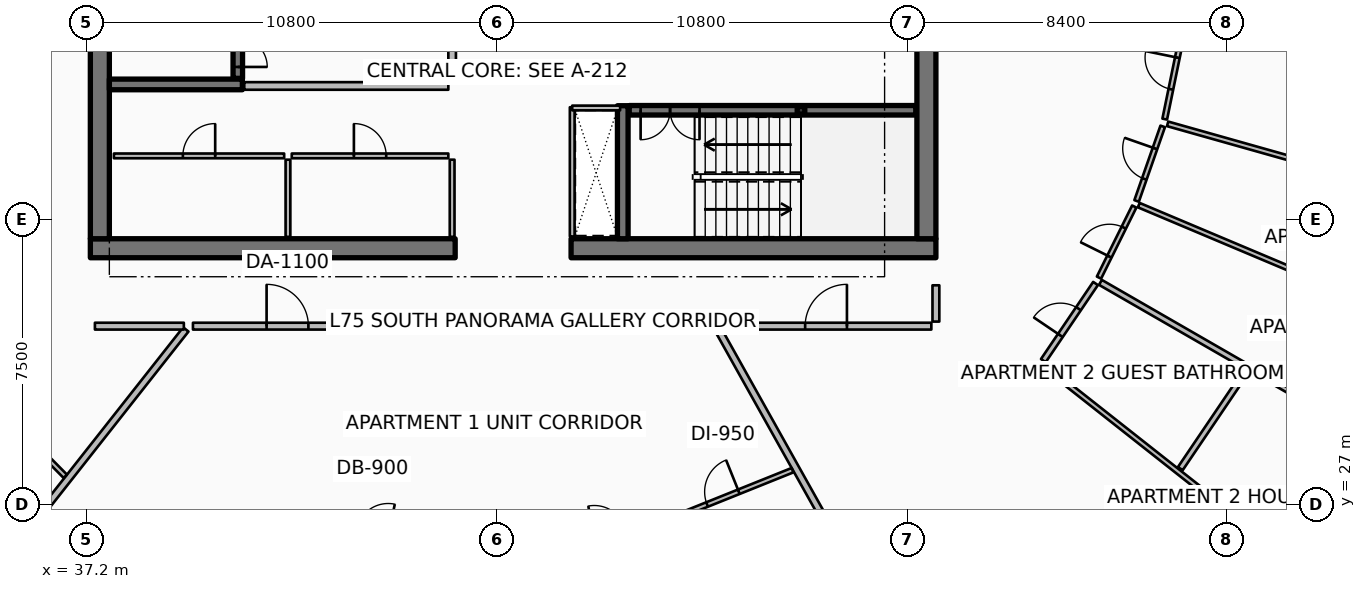
"""IFC4 building model, lengths in metres.
Left out: names, types, materials, properties, quantities, classifications, styles, units other than length and angle.
Written with IfcOpenShell. Run it as: python <this file> out.ifc"""

import sys

from ifc_helpers import new_model, si_unit, direction, frame, frame_2d, origin, origin_2d, place, context, subcontext, project, spatial, polyline, rectangle, hollow_rectangle, circle, outline, extrude, element, fill, save


model = new_model("IFC4")
c1 = context("Model", 3, precision=1e-05, world=origin(), true_north=direction((0.0, 1.0)))
c2 = subcontext(c1, "Body", "Model", "MODEL_VIEW")
j1 = project(units=[si_unit("LENGTHUNIT", "METRE"), si_unit("PLANEANGLEUNIT", "RADIAN")], contexts=[c1])
p1 = place(None, origin())
s1 = spatial("IfcSite", under=j1, at=p1, CompositionType="ELEMENT")
p2 = place(p1, origin())
s2 = spatial("IfcBuilding", under=s1, at=p2, CompositionType="ELEMENT")
p3 = place(p2, frame((0.0, 0.0, 298.3)))
s3 = spatial("IfcBuildingStorey", under=s2, at=p3, CompositionType="ELEMENT", Elevation=298.3)
p4 = place(p3, frame((37.3, 33.75, 0.0), z_axis=(0.0, 0.0, 1.0), x_axis=(1.0, 0.0, 0.0)))
e1 = element("IfcWall", 1, at=p4, inside=s3, PredefinedType="SHEAR", context=c2, shape_type="SweptSolid", body=[
    extrude(rectangle(XDim=9.6, YDim=0.5, at=frame_2d((4.8, 0.0))), origin(), (0.0, 0.0, 1.0), 3.85),
])
p5 = place(p3, frame((49.95, 33.75, 0.0), z_axis=(0.0, 0.0, 1.0), x_axis=(1.0, 0.0, 0.0)))
e2 = element("IfcWall", 2, at=p5, inside=s3, PredefinedType="SHEAR", context=c2, shape_type="SweptSolid", body=[
    extrude(rectangle(XDim=9.6, YDim=0.5, at=frame_2d((4.8, 0.0))), origin(), (0.0, 0.0, 1.0), 3.85),
])
for number, where, z_axis, x_axis in (
    (3, (37.55, 34.0, 0.0), (0.0, 0.0, 1.0), (0.0, 1.0, 0.0)),
    (4, (59.3, 34.0, 0.0), (0.0, 0.0, 1.0), (0.0, 1.0, 0.0)),
):
    element("IfcWall", number, at=place(p3, frame(where, z_axis=z_axis, x_axis=x_axis)), inside=s3, PredefinedType="SHEAR", context=c2, shape_type="SweptSolid", body=[
        extrude(rectangle(XDim=16.0, YDim=0.5, at=frame_2d((8.0, 0.0))), origin(), (0.0, 0.0, 1.0), 3.85),
    ])
for number, where, z_axis, x_axis in (
    (5, (37.8, 38.06, 0.0), (0.0, 0.0, 1.0), (1.0, 0.0, 0.0)),
    (6, (51.31, 34.0, 0.0), (0.0, 0.0, 1.0), (0.0, 1.0, 0.0)),
):
    element("IfcWall", number, at=place(p3, frame(where, z_axis=z_axis, x_axis=x_axis)), inside=s3, PredefinedType="SHEAR", context=c2, shape_type="SweptSolid", body=[
        extrude(rectangle(XDim=3.5, YDim=0.28, at=frame_2d((1.75, 0.0))), origin(), (0.0, 0.0, 1.0), 3.85),
    ])
p6 = place(p3, frame((56.0, 37.38, 0.0), z_axis=(0.0, 0.0, 1.0), x_axis=(1.0, 0.0, 0.0)))
e7 = element("IfcColumn", 7, at=p6, inside=s3, PredefinedType="COLUMN", context=c2, shape_type="SweptSolid", body=[
    extrude(hollow_rectangle(XDim=0.2, YDim=0.2, WallThickness=0.01, InnerFilletRadius=0.01, OuterFilletRadius=0.02, at=origin_2d()), origin(), (0.0, 0.0, 1.0), 1.72),
])
p7 = place(p3, frame((67.566, 26.575, 0.0), z_axis=(0.0, 0.0, 1.0), x_axis=(1.0, 0.0, 0.0)))
e8 = element("IfcColumn", 8, at=p7, inside=s3, PredefinedType="COLUMN", context=c2, shape_type="SweptSolid", body=[
    extrude(circle(Radius=0.475, at=origin_2d()), origin(), (0.0, 0.0, 1.0), 3.59),
])
p8 = place(p3, frame((66.067, 21.105, 0.0), z_axis=(0.0, 0.0, 1.0), x_axis=(0.777688536298, 0.628649775718, 0.0)))
e9 = element("IfcWall", 9, at=p8, inside=s3, PredefinedType="PARAPET", context=c2, shape_type="SweptSolid", body=[
    extrude(outline(polyline([(0.0, 0.0), (11.285, 0.0), (11.285, 1.148), (5.642, 1.127), (0.0, 1.224), (0.0, 0.0)])), frame((0.0, 0.09, 0.0), z_axis=(0.0, -1.0, 0.0), x_axis=(1.0, 0.0, 0.0)), (0.0, 0.0, 1.0), 0.18),
])
p9 = place(p3, frame((41.18, 38.22, 0.0), z_axis=(0.0, 0.0, 1.0), x_axis=(0.0, 1.0, 0.0)))
e10 = element("IfcWall", 10, at=p9, inside=s3, PredefinedType="SOLIDWALL", context=c2, shape_type="SweptSolid", body=[
    extrude(rectangle(XDim=7.56, YDim=0.25, at=frame_2d((3.78, 0.0))), origin(), (0.0, 0.0, 1.0), 3.59),
])
p10 = place(p9, frame((0.3, 0.0, 0.0)))
e11 = element("IfcOpeningElement", 11, at=p10, cuts=e10, PredefinedType="OPENING", context=c2, shape_type="SweptSolid", body=[
    extrude(rectangle(XDim=1.55, YDim=2.15, at=frame_2d((0.775, 1.075))), frame((0.0, 0.135, 0.0), z_axis=(0.0, -1.0, 0.0), x_axis=(1.0, 0.0, 0.0)), (0.0, 0.0, 1.0), 0.27),
])
p11 = place(p3, frame((51.48, 37.38, 0.0), z_axis=(0.0, 0.0, 1.0), x_axis=(1.0, 0.0, 0.0)))
e12 = element("IfcWall", 12, at=p11, inside=s3, PredefinedType="SOLIDWALL", context=c2, shape_type="SweptSolid", body=[
    extrude(rectangle(XDim=7.54, YDim=0.25, at=frame_2d((3.77, 0.0))), origin(), (0.0, 0.0, 1.0), 3.59),
])
p12 = place(p11, frame((0.3, 0.0, 0.0)))
e13 = element("IfcOpeningElement", 13, at=p12, cuts=e12, PredefinedType="OPENING", context=c2, shape_type="SweptSolid", body=[
    extrude(rectangle(XDim=1.55, YDim=2.15, at=frame_2d((0.775, 1.075))), frame((0.0, 0.135, 0.0), z_axis=(0.0, -1.0, 0.0), x_axis=(1.0, 0.0, 0.0)), (0.0, 0.0, 1.0), 0.27),
])
for number, where, z_axis, x_axis in (
    (14, (46.82, 34.05, 0.0), (0.0, 0.0, 1.0), (0.0, 1.0, 0.0)),
    (15, (42.5, 34.05, 0.0), (0.0, 0.0, 1.0), (0.0, 1.0, 0.0)),
):
    element("IfcWall", number, at=place(p3, frame(where, z_axis=z_axis, x_axis=x_axis)), inside=s3, PredefinedType="PARTITIONING", context=c2, shape_type="SweptSolid", body=[
        extrude(rectangle(XDim=2.03, YDim=0.125, at=frame_2d((1.015, 0.0))), origin(), (0.0, 0.0, 1.0), 3.03),
    ])
p13 = place(p3, frame((37.92, 36.18, 0.0), z_axis=(0.0, 0.0, 1.0), x_axis=(1.0, 0.0, 0.0)))
e16 = element("IfcWall", 16, at=p13, inside=s3, PredefinedType="PARTITIONING", context=c2, shape_type="SweptSolid", body=[
    extrude(rectangle(XDim=4.48, YDim=0.125, at=frame_2d((2.24, 0.0))), origin(), (0.0, 0.0, 1.0), 3.03),
])
p14 = place(p13, frame((1.815, 0.0, 0.0)))
e17 = element("IfcOpeningElement", 17, at=p14, cuts=e16, PredefinedType="OPENING", context=c2, shape_type="SweptSolid", body=[
    extrude(rectangle(XDim=0.85, YDim=2.06, at=frame_2d((0.425, 1.03))), frame((0.0, 0.073, 0.0), z_axis=(0.0, -1.0, 0.0), x_axis=(1.0, 0.0, 0.0)), (0.0, 0.0, 1.0), 0.145),
])
p15 = place(p3, frame((42.6, 36.18, 0.0), z_axis=(0.0, 0.0, 1.0), x_axis=(1.0, 0.0, 0.0)))
e18 = element("IfcWall", 18, at=p15, inside=s3, PredefinedType="PARTITIONING", context=c2, shape_type="SweptSolid", body=[
    extrude(rectangle(XDim=4.12, YDim=0.125, at=frame_2d((2.06, 0.0))), origin(), (0.0, 0.0, 1.0), 3.03),
])
p16 = place(p15, frame((1.635, 0.0, 0.0)))
e19 = element("IfcOpeningElement", 19, at=p16, cuts=e18, PredefinedType="OPENING", context=c2, shape_type="SweptSolid", body=[
    extrude(rectangle(XDim=0.85, YDim=2.06, at=frame_2d((0.425, 1.03))), frame((0.0, 0.073, 0.0), z_axis=(0.0, -1.0, 0.0), x_axis=(1.0, 0.0, 0.0)), (0.0, 0.0, 1.0), 0.145),
])
p17 = place(p3, frame((41.35, 38.02, 0.0), z_axis=(0.0, 0.0, 1.0), x_axis=(1.0, 0.0, 0.0)))
e20 = element("IfcWall", 20, at=p17, inside=s3, PredefinedType="PARTITIONING", context=c2, shape_type="SweptSolid", body=[
    extrude(rectangle(XDim=5.37, YDim=0.2, at=frame_2d((2.685, 0.0))), origin(), (0.0, 0.0, 1.0), 3.59),
])
p18 = place(p3, frame((46.82, 38.12, 0.0), z_axis=(0.0, 0.0, 1.0), x_axis=(0.0, 1.0, 0.0)))
e21 = element("IfcWall", 21, at=p18, inside=s3, PredefinedType="PARTITIONING", context=c2, shape_type="SweptSolid", body=[
    extrude(rectangle(XDim=3.26, YDim=0.2, at=frame_2d((1.63, 0.0))), origin(), (0.0, 0.0, 1.0), 3.59),
])
p19 = place(p18, frame((1.105, 0.0, 0.0)))
e22 = element("IfcOpeningElement", 22, at=p19, cuts=e21, PredefinedType="OPENING", context=c2, shape_type="SweptSolid", body=[
    extrude(rectangle(XDim=1.05, YDim=2.1, at=frame_2d((0.525, 1.05))), frame((0.0, 0.11, 0.0), z_axis=(0.0, -1.0, 0.0), x_axis=(1.0, 0.0, 0.0)), (0.0, 0.0, 1.0), 0.22),
])
p20 = place(p3, frame((49.98, 34.06, 0.0), z_axis=(0.0, 0.0, 1.0), x_axis=(0.0, 1.0, 0.0)))
e23 = element("IfcWall", 23, at=p20, inside=s3, PredefinedType="PARTITIONING", context=c2, shape_type="SweptSolid", body=[
    extrude(rectangle(XDim=3.4, YDim=0.125, at=frame_2d((1.7, 0.0))), origin(), (0.0, 0.0, 1.0), 3.03),
])
p21 = place(p3, frame((49.98, 37.44, 0.0), z_axis=(0.0, 0.0, 1.0), x_axis=(1.0, 0.0, 0.0)))
e24 = element("IfcWall", 24, at=p21, inside=s3, PredefinedType="PARTITIONING", context=c2, shape_type="SweptSolid", body=[
    extrude(rectangle(XDim=1.26, YDim=0.125, at=frame_2d((0.63, 0.0))), origin(), (0.0, 0.0, 1.0), 3.03),
])
p22 = place(p3, frame((39.812, 31.614, 0.0), z_axis=(0.0, 0.0, 1.0), x_axis=(-0.619097230176, -0.785314344443, 0.0)))
e25 = element("IfcWall", 25, at=p22, inside=s3, PredefinedType="PARTITIONING", context=c2, shape_type="SweptSolid", body=[
    extrude(rectangle(XDim=16.37, YDim=0.18, at=frame_2d((8.185, 0.0))), origin(), (0.0, 0.0, 1.0), 2.957),
])
p23 = place(p3, frame((53.822, 31.604, 0.0), z_axis=(0.0, 0.0, 1.0), x_axis=(0.48862858053, -0.872491896976, 0.0)))
e26 = element("IfcWall", 26, at=p23, inside=s3, PredefinedType="PARTITIONING", context=c2, shape_type="SweptSolid", body=[
    extrude(rectangle(XDim=12.679, YDim=0.18, at=frame_2d((6.34, 0.0))), origin(), (0.0, 0.0, 1.0), 2.957),
])
p24 = place(p3, frame((40.0, 31.7, 0.0), z_axis=(0.0, 0.0, 1.0), x_axis=(1.0, 0.0, 0.0)))
e27 = element("IfcWall", 27, at=p24, inside=s3, PredefinedType="PARTITIONING", context=c2, shape_type="SweptSolid", body=[
    extrude(rectangle(XDim=4.975, YDim=0.18, at=frame_2d((2.488, 0.0))), origin(), (0.0, 0.0, 1.0), 2.957),
])
p25 = place(p24, frame((1.938, 0.0, 0.0)))
e28 = element("IfcOpeningElement", 28, at=p25, cuts=e27, PredefinedType="OPENING", context=c2, shape_type="SweptSolid", body=[
    extrude(rectangle(XDim=1.1, YDim=2.1, at=frame_2d((0.55, 1.05))), frame((0.0, 0.1, 0.0), z_axis=(0.0, -1.0, 0.0), x_axis=(1.0, 0.0, 0.0)), (0.0, 0.0, 1.0), 0.2),
])
p26 = place(p3, frame((45.215, 31.7, 0.0), z_axis=(0.0, 0.0, 1.0), x_axis=(1.0, 0.0, 0.0)))
e29 = element("IfcWall", 29, at=p26, inside=s3, PredefinedType="PARTITIONING", context=c2, shape_type="SweptSolid", body=[
    extrude(rectangle(XDim=3.884, YDim=0.18, at=frame_2d((1.942, 0.0))), origin(), (0.0, 0.0, 1.0), 2.957),
])
p27 = place(p3, frame((49.339, 31.7, 0.0), z_axis=(0.0, 0.0, 1.0), x_axis=(1.0, 0.0, 0.0)))
e30 = element("IfcWall", 30, at=p27, inside=s3, PredefinedType="PARTITIONING", context=c2, shape_type="SweptSolid", body=[
    extrude(rectangle(XDim=4.309, YDim=0.18, at=frame_2d((2.155, 0.0))), origin(), (0.0, 0.0, 1.0), 2.957),
])
p28 = place(p3, frame((52.116, 26.439, 0.0), z_axis=(0.0, 0.0, 1.0), x_axis=(0.92786943094, 0.372905241486, 0.0)))
e31 = element("IfcWall", 31, at=p28, inside=s3, PredefinedType="PARTITIONING", context=c2, shape_type="SweptSolid", body=[
    extrude(rectangle(XDim=3.945, YDim=0.125, at=frame_2d((1.973, 0.0))), origin(), (0.0, 0.0, 1.0), 2.957),
])
p29 = place(p28, frame((1.523, 0.0, 0.0)))
e32 = element("IfcOpeningElement", 32, at=p29, cuts=e31, PredefinedType="OPENING", context=c2, shape_type="SweptSolid", body=[
    extrude(rectangle(XDim=0.9, YDim=2.08, at=frame_2d((0.45, 1.04))), frame((0.0, 0.073, 0.0), z_axis=(0.0, -1.0, 0.0), x_axis=(1.0, 0.0, 0.0)), (0.0, 0.0, 1.0), 0.145),
])
p30 = place(p3, frame((53.888, 31.7, 0.0), z_axis=(0.0, 0.0, 1.0), x_axis=(1.0, 0.0, 0.0)))
e33 = element("IfcWall", 33, at=p30, inside=s3, PredefinedType="PARTITIONING", context=c2, shape_type="SweptSolid", body=[
    extrude(rectangle(XDim=5.542, YDim=0.18, at=frame_2d((2.771, 0.0))), origin(), (0.0, 0.0, 1.0), 2.957),
])
p31 = place(p30, frame((2.221, 0.0, 0.0)))
e34 = element("IfcOpeningElement", 34, at=p31, cuts=e33, PredefinedType="OPENING", context=c2, shape_type="SweptSolid", body=[
    extrude(rectangle(XDim=1.1, YDim=2.1, at=frame_2d((0.55, 1.05))), frame((0.0, 0.1, 0.0), z_axis=(0.0, -1.0, 0.0), x_axis=(1.0, 0.0, 0.0)), (0.0, 0.0, 1.0), 0.2),
])
p32 = place(p3, frame((59.55, 31.82, 0.0), z_axis=(0.0, 0.0, 1.0), x_axis=(0.0, 1.0, 0.0)))
e35 = element("IfcWall", 35, at=p32, inside=s3, PredefinedType="PARTITIONING", context=c2, shape_type="SweptSolid", body=[
    extrude(rectangle(XDim=0.955, YDim=0.18, at=frame_2d((0.477, 0.0))), origin(), (0.0, 0.0, 1.0), 2.957),
])
p33 = place(p3, frame((62.399, 30.648, 0.0), z_axis=(0.0, 0.0, 1.0), x_axis=(0.785335435896, -0.619070475088, 0.0)))
e36 = element("IfcWall", 36, at=p33, inside=s3, PredefinedType="PARTITIONING", context=c2, shape_type="SweptSolid", body=[
    extrude(rectangle(XDim=8.749, YDim=0.125, at=frame_2d((4.374, 0.0))), origin(), (0.0, 0.0, 1.0), 2.957),
])
p34 = place(p3, frame((62.377, 30.793, 0.0), z_axis=(0.0, 0.0, 1.0), x_axis=(0.560572719222, 0.828105202534, 0.0)))
e37 = element("IfcWall", 37, at=p34, inside=s3, PredefinedType="PARTITIONING", context=c2, shape_type="SweptSolid", body=[
    extrude(rectangle(XDim=2.45, YDim=0.15, at=frame_2d((1.225, 0.0))), origin(), (0.0, 0.0, 1.0), 2.957),
])
p35 = place(p34, frame((0.8, 0.0, 0.0)))
e38 = element("IfcOpeningElement", 38, at=p35, cuts=e37, PredefinedType="OPENING", context=c2, shape_type="SweptSolid", body=[
    extrude(rectangle(XDim=0.85, YDim=2.06, at=frame_2d((0.425, 1.03))), frame((0.0, 0.085, 0.0), z_axis=(0.0, -1.0, 0.0), x_axis=(1.0, 0.0, 0.0)), (0.0, 0.0, 1.0), 0.17),
])
p36 = place(p3, frame((65.982, 27.951, 0.0), z_axis=(0.0, 0.0, 1.0), x_axis=(0.560619338422, 0.82807364249, 0.0)))
e39 = element("IfcWall", 39, at=p36, inside=s3, PredefinedType="PARTITIONING", context=c2, shape_type="SweptSolid", body=[
    extrude(rectangle(XDim=3.115, YDim=0.15, at=frame_2d((1.557, 0.0))), origin(), (0.0, 0.0, 1.0), 2.957),
])
p37 = place(p3, frame((63.879, 32.852, 0.0), z_axis=(0.0, 0.0, 1.0), x_axis=(0.866472506867, -0.499224793899, 0.0)))
e40 = element("IfcWall", 40, at=p37, inside=s3, PredefinedType="PARTITIONING", context=c2, shape_type="SweptSolid", body=[
    extrude(rectangle(XDim=4.46, YDim=0.15, at=frame_2d((2.23, 0.0))), origin(), (0.0, 0.0, 1.0), 3.03),
])
p38 = place(p3, frame((67.856, 30.56, 0.0), z_axis=(0.0, 0.0, 1.0), x_axis=(0.86648068721, -0.499210595533, 0.0)))
e41 = element("IfcWall", 41, at=p38, inside=s3, PredefinedType="PARTITIONING", context=c2, shape_type="SweptSolid", body=[
    extrude(rectangle(XDim=4.447, YDim=0.125, at=frame_2d((2.223, 0.0))), origin(), (0.0, 0.0, 1.0), 3.03),
])
p39 = place(p38, frame((1.798, 0.0, 0.0)))
e42 = element("IfcOpeningElement", 42, at=p39, cuts=e41, PredefinedType="OPENING", context=c2, shape_type="SweptSolid", body=[
    extrude(rectangle(XDim=0.85, YDim=2.06, at=frame_2d((0.425, 1.03))), frame((0.0, 0.073, 0.0), z_axis=(0.0, -1.0, 0.0), x_axis=(1.0, 0.0, 0.0)), (0.0, 0.0, 1.0), 0.145),
])
p40 = place(p3, frame((64.888, 34.884, 0.0), z_axis=(0.0, 0.0, 1.0), x_axis=(0.921531711532, -0.388303109235, 0.0)))
e43 = element("IfcWall", 43, at=p40, inside=s3, PredefinedType="PARTITIONING", context=c2, shape_type="SweptSolid", body=[
    extrude(rectangle(XDim=9.845, YDim=0.125, at=frame_2d((4.922, 0.0))), origin(), (0.0, 0.0, 1.0), 3.03),
])
p41 = place(p3, frame((63.841, 32.977, 0.0), z_axis=(0.0, 0.0, 1.0), x_axis=(0.444545737729, 0.895756153798, 0.0)))
e44 = element("IfcWall", 44, at=p41, inside=s3, PredefinedType="PARTITIONING", context=c2, shape_type="SweptSolid", body=[
    extrude(rectangle(XDim=2.088, YDim=0.125, at=frame_2d((1.044, 0.0))), origin(), (0.0, 0.0, 1.0), 3.03),
])
p42 = place(p41, frame((0.619, 0.0, 0.0)))
e45 = element("IfcOpeningElement", 45, at=p42, cuts=e44, PredefinedType="OPENING", context=c2, shape_type="SweptSolid", body=[
    extrude(rectangle(XDim=0.85, YDim=2.06, at=frame_2d((0.425, 1.03))), frame((0.0, 0.073, 0.0), z_axis=(0.0, -1.0, 0.0), x_axis=(1.0, 0.0, 0.0)), (0.0, 0.0, 1.0), 0.145),
])
p43 = place(p3, frame((64.832, 34.994, 0.0), z_axis=(0.0, 0.0, 1.0), x_axis=(0.330502190572, 0.943805224624, 0.0)))
e46 = element("IfcWall", 46, at=p43, inside=s3, PredefinedType="PARTITIONING", context=c2, shape_type="SweptSolid", body=[
    extrude(rectangle(XDim=2.078, YDim=0.125, at=frame_2d((1.039, 0.0))), origin(), (0.0, 0.0, 1.0), 2.957),
])
p44 = place(p43, frame((0.614, 0.0, 0.0)))
e47 = element("IfcOpeningElement", 47, at=p44, cuts=e46, PredefinedType="OPENING", context=c2, shape_type="SweptSolid", body=[
    extrude(rectangle(XDim=0.85, YDim=2.06, at=frame_2d((0.425, 1.03))), frame((0.0, 0.073, 0.0), z_axis=(0.0, -1.0, 0.0), x_axis=(1.0, 0.0, 0.0)), (0.0, 0.0, 1.0), 0.145),
])
p45 = place(p3, frame((65.647, 37.023, 0.0), z_axis=(0.0, 0.0, 1.0), x_axis=(0.962452900165, -0.271448733583, 0.0)))
e48 = element("IfcWall", 48, at=p45, inside=s3, PredefinedType="PARTITIONING", context=c2, shape_type="SweptSolid", body=[
    extrude(rectangle(XDim=11.16, YDim=0.125, at=frame_2d((5.58, 0.0))), origin(), (0.0, 0.0, 1.0), 2.957),
])
p46 = place(p3, frame((66.17, 39.617, 0.0), z_axis=(0.0, 0.0, 1.0), x_axis=(0.991515553817, -0.129988101526, 0.0)))
e49 = element("IfcWall", 49, at=p46, inside=s3, PredefinedType="PARTITIONING", context=c2, shape_type="SweptSolid", body=[
    extrude(rectangle(XDim=11.307, YDim=0.125, at=frame_2d((5.653, 0.0))), origin(), (0.0, 0.0, 1.0), 3.03),
])
p47 = place(p3, frame((65.571, 37.148, 0.0), z_axis=(0.0, 0.0, 1.0), x_axis=(0.201338395816, 0.979521745736, 0.0)))
e50 = element("IfcWall", 50, at=p47, inside=s3, PredefinedType="PARTITIONING", context=c2, shape_type="SweptSolid", body=[
    extrude(rectangle(XDim=2.453, YDim=0.125, at=frame_2d((1.227, 0.0))), origin(), (0.0, 0.0, 1.0), 2.957),
])
p48 = place(p47, frame((0.802, 0.0, 0.0)))
e51 = element("IfcOpeningElement", 51, at=p48, cuts=e50, PredefinedType="OPENING", context=c2, shape_type="SweptSolid", body=[
    extrude(rectangle(XDim=0.85, YDim=2.06, at=frame_2d((0.425, 1.03))), frame((0.0, 0.073, 0.0), z_axis=(0.0, -1.0, 0.0), x_axis=(1.0, 0.0, 0.0)), (0.0, 0.0, 1.0), 0.145),
])
p49 = place(p3, frame((37.42, 31.7, 0.0), z_axis=(0.0, 0.0, 1.0), x_axis=(1.0, 0.0, 0.0)))
e52 = element("IfcWall", 52, at=p49, inside=s3, PredefinedType="PARTITIONING", context=c2, shape_type="SweptSolid", body=[
    extrude(rectangle(XDim=2.34, YDim=0.18, at=frame_2d((1.17, 0.0))), origin(), (0.0, 0.0, 1.0), 2.957),
])
p50 = place(p3, frame((33.594, 30.834, 0.0), z_axis=(0.0, 0.0, 1.0), x_axis=(0.702642820289, -0.711542737365, 0.0)))
e53 = element("IfcWall", 53, at=p50, inside=s3, PredefinedType="PARTITIONING", context=c2, shape_type="SweptSolid", body=[
    extrude(rectangle(XDim=4.334, YDim=0.125, at=frame_2d((2.167, 0.0))), origin(), (0.0, 0.0, 1.0), 2.957),
])
p51 = place(p50, frame((1.717, 0.0, 0.0)))
e54 = element("IfcOpeningElement", 54, at=p51, cuts=e53, PredefinedType="OPENING", context=c2, shape_type="SweptSolid", body=[
    extrude(rectangle(XDim=0.9, YDim=2.08, at=frame_2d((0.45, 1.04))), frame((0.0, 0.073, 0.0), z_axis=(0.0, -1.0, 0.0), x_axis=(1.0, 0.0, 0.0)), (0.0, 0.0, 1.0), 0.145),
])
p52 = place(p10, origin())
e55 = element("IfcDoor", 55, at=p52, inside=s3, OperationType="DOUBLE_DOOR_SINGLE_SWING", PredefinedType="DOOR", context=c2, shape_type="SweptSolid", body=[
    extrude(rectangle(XDim=1.55, YDim=2.15, at=frame_2d((0.775, 1.075))), frame((0.0, 0.025, 0.0), z_axis=(0.0, -1.0, 0.0), x_axis=(1.0, 0.0, 0.0)), (0.0, 0.0, 1.0), 0.05),
])
fill(e11, e55)
p53 = place(p12, origin())
e56 = element("IfcDoor", 56, at=p53, inside=s3, OperationType="DOUBLE_DOOR_SINGLE_SWING", PredefinedType="DOOR", context=c2, shape_type="SweptSolid", body=[
    extrude(rectangle(XDim=1.55, YDim=2.15, at=frame_2d((0.775, 1.075))), frame((0.0, 0.025, 0.0), z_axis=(0.0, -1.0, 0.0), x_axis=(1.0, 0.0, 0.0)), (0.0, 0.0, 1.0), 0.05),
])
fill(e13, e56)
p54 = place(p14, origin())
e57 = element("IfcDoor", 57, at=p54, inside=s3, OperationType="SINGLE_SWING_RIGHT", PredefinedType="DOOR", context=c2, shape_type="SweptSolid", body=[
    extrude(rectangle(XDim=0.85, YDim=2.06, at=frame_2d((0.425, 1.03))), frame((0.0, 0.025, 0.0), z_axis=(0.0, -1.0, 0.0), x_axis=(1.0, 0.0, 0.0)), (0.0, 0.0, 1.0), 0.05),
])
fill(e17, e57)
p55 = place(p16, origin())
e58 = element("IfcDoor", 58, at=p55, inside=s3, OperationType="SINGLE_SWING_LEFT", PredefinedType="DOOR", context=c2, shape_type="SweptSolid", body=[
    extrude(rectangle(XDim=0.85, YDim=2.06, at=frame_2d((0.425, 1.03))), frame((0.0, 0.025, 0.0), z_axis=(0.0, -1.0, 0.0), x_axis=(1.0, 0.0, 0.0)), (0.0, 0.0, 1.0), 0.05),
])
fill(e19, e58)
p56 = place(p25, origin())
e59 = element("IfcDoor", 59, at=p56, inside=s3, OperationType="SINGLE_SWING_LEFT", PredefinedType="DOOR", context=c2, shape_type="SweptSolid", body=[
    extrude(rectangle(XDim=1.1, YDim=2.1, at=frame_2d((0.55, 1.05))), frame((0.0, 0.025, 0.0), z_axis=(0.0, -1.0, 0.0), x_axis=(1.0, 0.0, 0.0)), (0.0, 0.0, 1.0), 0.05),
])
fill(e28, e59)
p57 = place(p29, origin())
e60 = element("IfcDoor", 60, at=p57, inside=s3, OperationType="SINGLE_SWING_RIGHT", PredefinedType="DOOR", context=c2, shape_type="SweptSolid", body=[
    extrude(rectangle(XDim=0.9, YDim=2.08, at=frame_2d((0.45, 1.04))), frame((0.0, 0.025, 0.0), z_axis=(0.0, -1.0, 0.0), x_axis=(1.0, 0.0, 0.0)), (0.0, 0.0, 1.0), 0.05),
])
fill(e32, e60)
p58 = place(p31, origin())
e61 = element("IfcDoor", 61, at=p58, inside=s3, OperationType="SINGLE_SWING_RIGHT", PredefinedType="DOOR", context=c2, shape_type="SweptSolid", body=[
    extrude(rectangle(XDim=1.1, YDim=2.1, at=frame_2d((0.55, 1.05))), frame((0.0, 0.025, 0.0), z_axis=(0.0, -1.0, 0.0), x_axis=(1.0, 0.0, 0.0)), (0.0, 0.0, 1.0), 0.05),
])
fill(e34, e61)
p59 = place(p35, origin())
e62 = element("IfcDoor", 62, at=p59, inside=s3, OperationType="SINGLE_SWING_LEFT", PredefinedType="DOOR", context=c2, shape_type="SweptSolid", body=[
    extrude(rectangle(XDim=0.85, YDim=2.06, at=frame_2d((0.425, 1.03))), frame((0.0, 0.025, 0.0), z_axis=(0.0, -1.0, 0.0), x_axis=(1.0, 0.0, 0.0)), (0.0, 0.0, 1.0), 0.05),
])
fill(e38, e62)
p60 = place(p42, origin())
e63 = element("IfcDoor", 63, at=p60, inside=s3, OperationType="SINGLE_SWING_LEFT", PredefinedType="DOOR", context=c2, shape_type="SweptSolid", body=[
    extrude(rectangle(XDim=0.85, YDim=2.06, at=frame_2d((0.425, 1.03))), frame((0.0, 0.025, 0.0), z_axis=(0.0, -1.0, 0.0), x_axis=(1.0, 0.0, 0.0)), (0.0, 0.0, 1.0), 0.05),
])
fill(e45, e63)
p61 = place(p44, origin())
e64 = element("IfcDoor", 64, at=p61, inside=s3, OperationType="SINGLE_SWING_RIGHT", PredefinedType="DOOR", context=c2, shape_type="SweptSolid", body=[
    extrude(rectangle(XDim=0.85, YDim=2.06, at=frame_2d((0.425, 1.03))), frame((0.0, 0.025, 0.0), z_axis=(0.0, -1.0, 0.0), x_axis=(1.0, 0.0, 0.0)), (0.0, 0.0, 1.0), 0.05),
])
fill(e47, e64)
p62 = place(p48, origin())
e65 = element("IfcDoor", 65, at=p62, inside=s3, OperationType="SINGLE_SWING_RIGHT", PredefinedType="DOOR", context=c2, shape_type="SweptSolid", body=[
    extrude(rectangle(XDim=0.85, YDim=2.06, at=frame_2d((0.425, 1.03))), frame((0.0, 0.025, 0.0), z_axis=(0.0, -1.0, 0.0), x_axis=(1.0, 0.0, 0.0)), (0.0, 0.0, 1.0), 0.05),
])
fill(e51, e65)
save(model, sys.argv[1])
